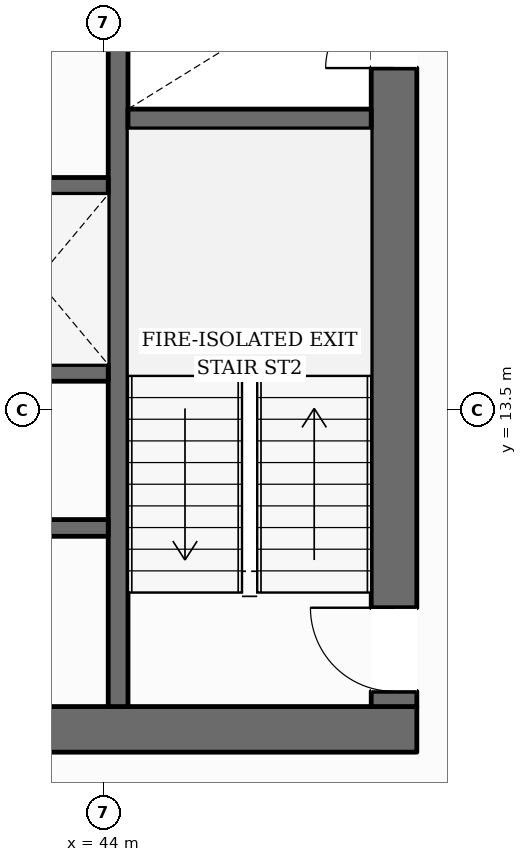
"""IFC4 building model, lengths in metres.
Left out: names, types, materials, properties, quantities, classifications, styles, units other than length and angle.
Written with IfcOpenShell. Run it as: python <this file> out.ifc"""

import sys

from ifc_helpers import new_model, si_unit, direction, frame, frame_2d, origin, place, context, subcontext, project, spatial, rectangle, extrude, element, fill, save


model = new_model("IFC4")
c1 = context("Model", 3, precision=1e-05, world=origin(), true_north=direction((0.0, 1.0)))
c2 = subcontext(c1, "Body", "Model", "MODEL_VIEW")
j1 = project(units=[si_unit("LENGTHUNIT", "METRE"), si_unit("PLANEANGLEUNIT", "RADIAN")], contexts=[c1])
p1 = place(None, origin())
s1 = spatial("IfcSite", under=j1, at=p1, CompositionType="ELEMENT")
p2 = place(p1, origin())
s2 = spatial("IfcBuilding", under=s1, at=p2, CompositionType="ELEMENT")
p3 = place(p2, frame((0.0, 0.0, 71.45)))
s3 = spatial("IfcBuildingStorey", under=s2, at=p3, CompositionType="ELEMENT", Elevation=71.45)
p4 = place(p3, frame((27.88, 9.3, 0.0), z_axis=(0.0, 0.0, 1.0), x_axis=(1.0, 0.0, 0.0)))
e1 = element("IfcWall", 1, at=p4, inside=s3, PredefinedType="SOLIDWALL", context=c2, shape_type="SweptSolid", body=[
    extrude(rectangle(XDim=20.24, YDim=0.6, at=frame_2d((10.12, 0.0))), origin(), (0.0, 0.0, 1.0), 3.43),
])
p5 = place(p4, frame((10.62, 0.0, 0.0)))
e2 = element("IfcOpeningElement", 2, at=p5, cuts=e1, PredefinedType="OPENING", context=c2, shape_type="SweptSolid", body=[
    extrude(rectangle(XDim=1.4, YDim=2.2, at=frame_2d((0.7, 1.1))), frame((0.0, 0.31, 0.0), z_axis=(0.0, -1.0, 0.0), x_axis=(1.0, 0.0, 0.0)), (0.0, 0.0, 1.0), 0.62),
])
p6 = place(p3, frame((47.82, 9.6, 0.0), z_axis=(0.0, 0.0, 1.0), x_axis=(0.0, 1.0, 0.0)))
e3 = element("IfcWall", 3, at=p6, inside=s3, PredefinedType="SOLIDWALL", context=c2, shape_type="SweptSolid", body=[
    extrude(rectangle(XDim=13.0, YDim=0.6, at=frame_2d((6.5, 0.0))), origin(), (0.0, 0.0, 1.0), 3.43),
])
p7 = place(p6, frame((0.2, 0.0, 0.0)))
e4 = element("IfcOpeningElement", 4, at=p7, cuts=e3, PredefinedType="OPENING", context=c2, shape_type="SweptSolid", body=[
    extrude(rectangle(XDim=1.1, YDim=2.15, at=frame_2d((0.55, 1.075))), frame((0.0, 0.31, 0.0), z_axis=(0.0, -1.0, 0.0), x_axis=(1.0, 0.0, 0.0)), (0.0, 0.0, 1.0), 0.62),
])
p8 = place(p6, frame((8.4, 0.0, 0.0)))
e5 = element("IfcOpeningElement", 5, at=p8, cuts=e3, PredefinedType="OPENING", context=c2, shape_type="SweptSolid", body=[
    extrude(rectangle(XDim=0.9, YDim=2.1, at=frame_2d((0.45, 1.05))), frame((0.0, 0.31, 0.0), z_axis=(0.0, -1.0, 0.0), x_axis=(1.0, 0.0, 0.0)), (0.0, 0.0, 1.0), 0.62),
])
p9 = place(p3, frame((44.19, 9.6, 0.0), z_axis=(0.0, 0.0, 1.0), x_axis=(0.0, 1.0, 0.0)))
e6 = element("IfcWall", 6, at=p9, inside=s3, PredefinedType="SHEAR", context=c2, shape_type="SweptSolid", body=[
    extrude(rectangle(XDim=13.0, YDim=0.26, at=frame_2d((6.5, 0.0))), origin(), (0.0, 0.0, 1.0), 3.43),
])
p10 = place(p9, frame((10.925, 0.0, 0.0)))
e7 = element("IfcOpeningElement", 7, at=p10, cuts=e6, PredefinedType="OPENING", context=c2, shape_type="SweptSolid", body=[
    extrude(rectangle(XDim=1.25, YDim=2.25, at=frame_2d((0.625, 1.125))), frame((0.0, 0.14, 0.0), z_axis=(0.0, -1.0, 0.0), x_axis=(1.0, 0.0, 0.0)), (0.0, 0.0, 1.0), 0.28),
])
p11 = place(p3, frame((44.32, 17.33, 0.0), z_axis=(0.0, 0.0, 1.0), x_axis=(1.0, 0.0, 0.0)))
e8 = element("IfcWall", 8, at=p11, inside=s3, PredefinedType="SHEAR", context=c2, shape_type="SweptSolid", body=[
    extrude(rectangle(XDim=3.2, YDim=0.26, at=frame_2d((1.6, 0.0))), origin(), (0.0, 0.0, 1.0), 3.43),
])
p12 = place(p3, frame((31.94, 16.45, 0.0), z_axis=(0.0, 0.0, 1.0), x_axis=(1.0, 0.0, 0.0)))
e9 = element("IfcWall", 9, at=p12, inside=s3, PredefinedType="SOLIDWALL", context=c2, shape_type="SweptSolid", body=[
    extrude(rectangle(XDim=12.12, YDim=0.22, at=frame_2d((6.06, 0.0))), origin(), (0.0, 0.0, 1.0), 3.43),
])
p13 = place(p3, frame((31.94, 13.99, 0.0), z_axis=(0.0, 0.0, 1.0), x_axis=(1.0, 0.0, 0.0)))
e10 = element("IfcWall", 10, at=p13, inside=s3, PredefinedType="SOLIDWALL", context=c2, shape_type="SweptSolid", body=[
    extrude(rectangle(XDim=12.12, YDim=0.22, at=frame_2d((6.06, 0.0))), origin(), (0.0, 0.0, 1.0), 3.43),
])
p14 = place(p13, frame((0.385, 0.0, 0.0)))
e11 = element("IfcOpeningElement", 11, at=p14, cuts=e10, PredefinedType="OPENING", context=c2, shape_type="SweptSolid", body=[
    extrude(rectangle(XDim=1.1, YDim=2.2, at=frame_2d((0.55, 1.1))), frame((0.0, 0.12, 0.0), z_axis=(0.0, -1.0, 0.0), x_axis=(1.0, 0.0, 0.0)), (0.0, 0.0, 1.0), 0.24),
])
p15 = place(p13, frame((2.435, 0.0, 0.0)))
e12 = element("IfcOpeningElement", 12, at=p15, cuts=e10, PredefinedType="OPENING", context=c2, shape_type="SweptSolid", body=[
    extrude(rectangle(XDim=1.1, YDim=2.2, at=frame_2d((0.55, 1.1))), frame((0.0, 0.12, 0.0), z_axis=(0.0, -1.0, 0.0), x_axis=(1.0, 0.0, 0.0)), (0.0, 0.0, 1.0), 0.24),
])
p16 = place(p13, frame((4.485, 0.0, 0.0)))
e13 = element("IfcOpeningElement", 13, at=p16, cuts=e10, PredefinedType="OPENING", context=c2, shape_type="SweptSolid", body=[
    extrude(rectangle(XDim=1.1, YDim=2.2, at=frame_2d((0.55, 1.1))), frame((0.0, 0.12, 0.0), z_axis=(0.0, -1.0, 0.0), x_axis=(1.0, 0.0, 0.0)), (0.0, 0.0, 1.0), 0.24),
])
p17 = place(p3, frame((40.28, 11.95, 0.0), z_axis=(0.0, 0.0, 1.0), x_axis=(1.0, 0.0, 0.0)))
e14 = element("IfcWall", 14, at=p17, inside=s3, PredefinedType="SOLIDWALL", context=c2, shape_type="SweptSolid", body=[
    extrude(rectangle(XDim=3.78, YDim=0.22, at=frame_2d((1.89, 0.0))), origin(), (0.0, 0.0, 1.0), 3.43),
])
p18 = place(p17, frame((1.55, 0.0, 0.0)))
e15 = element("IfcOpeningElement", 15, at=p18, cuts=e14, PredefinedType="OPENING", context=c2, shape_type="SweptSolid", body=[
    extrude(rectangle(XDim=0.9, YDim=2.1, at=frame_2d((0.45, 1.05))), frame((0.0, 0.12, 0.0), z_axis=(0.0, -1.0, 0.0), x_axis=(1.0, 0.0, 0.0)), (0.0, 0.0, 1.0), 0.24),
])
p19 = place(p3, frame((44.918, 44.961, 0.0), z_axis=(0.0, 0.0, 1.0), x_axis=(0.499266462474, -0.866448497863, 0.0)))
e16 = element("IfcWall", 16, at=p19, inside=s3, PredefinedType="STANDARD", context=c2, shape_type="SweptSolid", body=[
    extrude(rectangle(XDim=36.221, YDim=0.38, at=frame_2d((18.11, 0.0))), origin(), (0.0, 0.0, 1.0), 2.81),
])
p20 = place(p19, frame((31.979, 0.0, 0.55)))
e17 = element("IfcOpeningElement", 17, at=p20, cuts=e16, PredefinedType="OPENING", context=c2, shape_type="SweptSolid", body=[
    extrude(rectangle(XDim=1.65, YDim=1.6, at=frame_2d((0.825, 0.8))), frame((0.0, 0.2, 0.0), z_axis=(0.0, -1.0, 0.0), x_axis=(1.0, 0.0, 0.0)), (0.0, 0.0, 1.0), 0.4),
])
p21 = place(p19, frame((26.102, 0.0, 0.55)))
e18 = element("IfcOpeningElement", 18, at=p21, cuts=e16, PredefinedType="OPENING", context=c2, shape_type="SweptSolid", body=[
    extrude(rectangle(XDim=1.65, YDim=1.6, at=frame_2d((0.825, 0.8))), frame((0.0, 0.2, 0.0), z_axis=(0.0, -1.0, 0.0), x_axis=(1.0, 0.0, 0.0)), (0.0, 0.0, 1.0), 0.4),
])
p22 = place(p19, frame((20.224, 0.0, 0.55)))
e19 = element("IfcOpeningElement", 19, at=p22, cuts=e16, PredefinedType="OPENING", context=c2, shape_type="SweptSolid", body=[
    extrude(rectangle(XDim=1.65, YDim=1.6, at=frame_2d((0.825, 0.8))), frame((0.0, 0.2, 0.0), z_axis=(0.0, -1.0, 0.0), x_axis=(1.0, 0.0, 0.0)), (0.0, 0.0, 1.0), 0.4),
])
p23 = place(p19, frame((8.47, 0.0, 0.55)))
e20 = element("IfcOpeningElement", 20, at=p23, cuts=e16, PredefinedType="OPENING", context=c2, shape_type="SweptSolid", body=[
    extrude(rectangle(XDim=1.65, YDim=1.6, at=frame_2d((0.825, 0.8))), frame((0.0, 0.2, 0.0), z_axis=(0.0, -1.0, 0.0), x_axis=(1.0, 0.0, 0.0)), (0.0, 0.0, 1.0), 0.4),
])
p24 = place(p19, frame((2.593, 0.0, 0.55)))
e21 = element("IfcOpeningElement", 21, at=p24, cuts=e16, PredefinedType="OPENING", context=c2, shape_type="SweptSolid", body=[
    extrude(rectangle(XDim=1.65, YDim=1.6, at=frame_2d((0.825, 0.8))), frame((0.0, 0.2, 0.0), z_axis=(0.0, -1.0, 0.0), x_axis=(1.0, 0.0, 0.0)), (0.0, 0.0, 1.0), 0.4),
])
p25 = place(p7, origin())
e22 = element("IfcDoor", 22, at=p25, inside=s3, OperationType="SINGLE_SWING_RIGHT", PredefinedType="DOOR", context=c2, shape_type="SweptSolid", body=[
    extrude(rectangle(XDim=1.1, YDim=2.15, at=frame_2d((0.55, 1.075))), frame((0.0, 0.025, 0.0), z_axis=(0.0, -1.0, 0.0), x_axis=(1.0, 0.0, 0.0)), (0.0, 0.0, 1.0), 0.05),
])
fill(e4, e22)
p26 = place(p8, origin())
e23 = element("IfcDoor", 23, at=p26, inside=s3, OperationType="SINGLE_SWING_LEFT", PredefinedType="DOOR", context=c2, shape_type="SweptSolid", body=[
    extrude(rectangle(XDim=0.9, YDim=2.1, at=frame_2d((0.45, 1.05))), frame((0.0, 0.025, 0.0), z_axis=(0.0, -1.0, 0.0), x_axis=(1.0, 0.0, 0.0)), (0.0, 0.0, 1.0), 0.05),
])
fill(e5, e23)
save(model, sys.argv[1])
